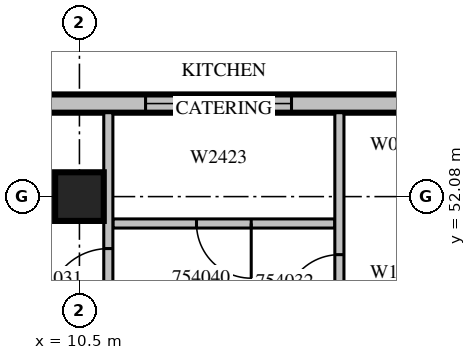
"""IFC4 building model, lengths in metres.
Left out: names, types, materials, properties, quantities, classifications, styles, units other than length and angle.
Written with IfcOpenShell. Run it as: python <this file> out.ifc"""

import sys

from ifc_helpers import new_model, si_unit, direction, frame, frame_2d, origin, origin_2d, place, context, subcontext, project, spatial, rectangle, extrude, source, transform, mapped, element, fill, save


model = new_model("IFC4")
c1 = context("Model", 3, precision=1e-05, world=origin(), true_north=direction((0.0, 1.0)))
c2 = subcontext(c1, "Body", "Model", "MODEL_VIEW")
j1 = project(units=[si_unit("LENGTHUNIT", "METRE"), si_unit("PLANEANGLEUNIT", "RADIAN")], contexts=[c1])
p1 = place(None, origin())
s1 = spatial("IfcSite", under=j1, at=p1, CompositionType="ELEMENT")
p2 = place(p1, origin())
s2 = spatial("IfcBuilding", under=s1, at=p2, CompositionType="ELEMENT")
p3 = place(p2, frame((0.0, 0.0, 238.6)))
s3 = spatial("IfcBuildingStorey", under=s2, at=p3, CompositionType="ELEMENT", Elevation=238.6)
m1 = source(origin(), c2, "Body", "SweptSolid", [
    extrude(rectangle(XDim=0.8, YDim=0.8, at=origin_2d()), origin(), (0.0, 0.0, 1.0), 3.8),
])
p4 = place(p3, frame((10.5, 52.08, 0.0), z_axis=(0.0, 0.0, 1.0), x_axis=(1.0, 0.0, 0.0)))
e1 = element("IfcColumn", 1, at=p4, inside=s3, PredefinedType="COLUMN", context=c2, shape_type="MappedRepresentation", body=[
    mapped(m1, transform((0.0, 0.0, 0.0), scale=1.0)),
])
m2 = source(origin(), c2, "Body", "SweptSolid", [
    extrude(rectangle(XDim=10.5, YDim=0.3, at=frame_2d((5.25, 0.0))), origin(), (0.0, 0.0, 1.0), 3.4),
])
p5 = place(p3, frame((16.8, 53.61, 0.0), z_axis=(0.0, 0.0, 1.0), x_axis=(-1.0, 0.0, 0.0)))
e2 = element("IfcWall", 2, at=p5, inside=s3, PredefinedType="STANDARD", context=c2, shape_type="MappedRepresentation", body=[
    mapped(m2, transform((0.0, 0.0, 0.0), scale=1.0)),
])
m3 = source(origin(), c2, "Body", "SweptSolid", [
    extrude(rectangle(XDim=1.8, YDim=2.3, at=frame_2d((0.9, 1.15))), frame((0.0, 0.16, 0.0), z_axis=(0.0, -1.0, 0.0), x_axis=(1.0, 0.0, 0.0)), (0.0, 0.0, 1.0), 0.32),
])
p6 = place(p5, frame((8.025, 0.0, 0.6)))
e3 = element("IfcOpeningElement", 3, at=p6, cuts=e2, PredefinedType="OPENING", context=c2, shape_type="MappedRepresentation", body=[
    mapped(m3, transform((0.0, 0.0, 0.0), scale=1.0)),
])
m4 = source(origin(), c2, "Body", "SweptSolid", [
    extrude(rectangle(XDim=2.4, YDim=2.3, at=frame_2d((1.2, 1.15))), frame((0.0, 0.16, 0.0), z_axis=(0.0, -1.0, 0.0), x_axis=(1.0, 0.0, 0.0)), (0.0, 0.0, 1.0), 0.32),
])
p7 = place(p5, frame((2.812, 0.0, 0.6)))
e4 = element("IfcOpeningElement", 4, at=p7, cuts=e2, PredefinedType="OPENING", context=c2, shape_type="MappedRepresentation", body=[
    mapped(m4, transform((0.0, 0.0, 0.0), scale=1.0)),
])
m5 = source(origin(), c2, "Body", "SweptSolid", [
    extrude(rectangle(XDim=3.65, YDim=0.15, at=frame_2d((1.825, 0.0))), origin(), (0.0, 0.0, 1.0), 3.4),
])
p8 = place(p3, frame((14.7, 51.638, 0.0), z_axis=(0.0, 0.0, 1.0), x_axis=(-1.0, 0.0, 0.0)))
e5 = element("IfcWall", 5, at=p8, inside=s3, PredefinedType="PARTITIONING", context=c2, shape_type="MappedRepresentation", body=[
    mapped(m5, transform((0.0, 0.0, 0.0), scale=1.0)),
])
m6 = source(origin(), c2, "Body", "SweptSolid", [
    extrude(rectangle(XDim=0.9, YDim=2.1, at=frame_2d((0.45, 1.05))), frame((0.0, 0.085, 0.0), z_axis=(0.0, -1.0, 0.0), x_axis=(1.0, 0.0, 0.0)), (0.0, 0.0, 1.0), 0.17),
])
p9 = place(p8, frame((1.375, 0.0, 0.0)))
e6 = element("IfcOpeningElement", 6, at=p9, cuts=e5, PredefinedType="OPENING", context=c2, shape_type="MappedRepresentation", body=[
    mapped(m6, transform((0.0, 0.0, 0.0), scale=1.0)),
])
m7 = source(origin(), c2, "Body", "SweptSolid", [
    extrude(rectangle(XDim=7.26, YDim=0.15, at=frame_2d((3.63, 0.0))), origin(), (0.0, 0.0, 1.0), 3.4),
])
p10 = place(p3, frame((10.975, 46.2, 0.0), z_axis=(0.0, 0.0, 1.0), x_axis=(0.0, 1.0, 0.0)))
e7 = element("IfcWall", 7, at=p10, inside=s3, PredefinedType="PARTITIONING", context=c2, shape_type="MappedRepresentation", body=[
    mapped(m7, transform((0.0, 0.0, 0.0), scale=1.0)),
])
m8 = source(origin(), c2, "Body", "SweptSolid", [
    extrude(rectangle(XDim=1.6, YDim=2.1, at=frame_2d((0.8, 1.05))), frame((0.0, 0.085, 0.0), z_axis=(0.0, -1.0, 0.0), x_axis=(1.0, 0.0, 0.0)), (0.0, 0.0, 1.0), 0.17),
])
p11 = place(p10, frame((1.169, 0.0, 0.0)))
e8 = element("IfcOpeningElement", 8, at=p11, cuts=e7, PredefinedType="OPENING", context=c2, shape_type="MappedRepresentation", body=[
    mapped(m8, transform((0.0, 0.0, 0.0), scale=1.0)),
])
m9 = source(origin(), c2, "Body", "SweptSolid", [
    extrude(rectangle(XDim=1.0, YDim=2.1, at=frame_2d((0.5, 1.05))), frame((0.0, 0.085, 0.0), z_axis=(0.0, -1.0, 0.0), x_axis=(1.0, 0.0, 0.0)), (0.0, 0.0, 1.0), 0.17),
])
p12 = place(p10, frame((4.025, 0.0, 0.0)))
e9 = element("IfcOpeningElement", 9, at=p12, cuts=e7, PredefinedType="OPENING", context=c2, shape_type="MappedRepresentation", body=[
    mapped(m9, transform((0.0, 0.0, 0.0), scale=1.0)),
])
p13 = place(p3, frame((14.775, 46.2, 0.0), z_axis=(0.0, 0.0, 1.0), x_axis=(0.0, 1.0, 0.0)))
e10 = element("IfcWall", 10, at=p13, inside=s3, PredefinedType="PARTITIONING", context=c2, shape_type="MappedRepresentation", body=[
    mapped(m7, transform((0.0, 0.0, 0.0), scale=1.0)),
])
p14 = place(p13, frame((0.956, 0.0, 0.0)))
e11 = element("IfcOpeningElement", 11, at=p14, cuts=e10, PredefinedType="OPENING", context=c2, shape_type="MappedRepresentation", body=[
    mapped(m8, transform((0.0, 0.0, 0.0), scale=1.0)),
])
p15 = place(p13, frame((4.025, 0.0, 0.0)))
e12 = element("IfcOpeningElement", 12, at=p15, cuts=e10, PredefinedType="OPENING", context=c2, shape_type="MappedRepresentation", body=[
    mapped(m6, transform((0.0, 0.0, 0.0), scale=1.0)),
])
m10 = source(origin(), c2, "Body", "SweptSolid", [
    extrude(rectangle(XDim=2.4, YDim=2.3, at=frame_2d((1.2, 1.15))), frame((0.0, 0.03, 0.0), z_axis=(0.0, -1.0, 0.0), x_axis=(1.0, 0.0, 0.0)), (0.0, 0.0, 1.0), 0.06),
])
p16 = place(p7, origin())
e13 = element("IfcWindow", 13, at=p16, inside=s3, PartitioningType="SINGLE_PANEL", PredefinedType="WINDOW", context=c2, shape_type="MappedRepresentation", body=[
    mapped(m10, transform((0.0, 0.0, 0.0), scale=1.0)),
])
fill(e4, e13)
m11 = source(origin(), c2, "Body", "SweptSolid", [
    extrude(rectangle(XDim=1.0, YDim=2.1, at=frame_2d((0.5, 1.05))), frame((0.0, 0.025, 0.0), z_axis=(0.0, -1.0, 0.0), x_axis=(1.0, 0.0, 0.0)), (0.0, 0.0, 1.0), 0.05),
])
p17 = place(p12, origin())
e14 = element("IfcDoor", 14, at=p17, inside=s3, OperationType="SINGLE_SWING_LEFT", PredefinedType="DOOR", context=c2, shape_type="MappedRepresentation", body=[
    mapped(m11, transform((0.0, 0.0, 0.0), scale=1.0)),
])
fill(e9, e14)
m12 = source(origin(), c2, "Body", "SweptSolid", [
    extrude(rectangle(XDim=0.9, YDim=2.1, at=frame_2d((0.45, 1.05))), frame((0.0, 0.025, 0.0), z_axis=(0.0, -1.0, 0.0), x_axis=(1.0, 0.0, 0.0)), (0.0, 0.0, 1.0), 0.05),
])
p18 = place(p15, origin())
e15 = element("IfcDoor", 15, at=p18, inside=s3, OperationType="SINGLE_SWING_LEFT", PredefinedType="DOOR", context=c2, shape_type="MappedRepresentation", body=[
    mapped(m12, transform((0.0, 0.0, 0.0), scale=1.0)),
])
fill(e12, e15)
p19 = place(p9, origin())
e16 = element("IfcDoor", 16, at=p19, inside=s3, OperationType="SINGLE_SWING_LEFT", PredefinedType="DOOR", context=c2, shape_type="MappedRepresentation", body=[
    mapped(m12, transform((0.0, 0.0, 0.0), scale=1.0)),
])
fill(e6, e16)
save(model, sys.argv[1])
